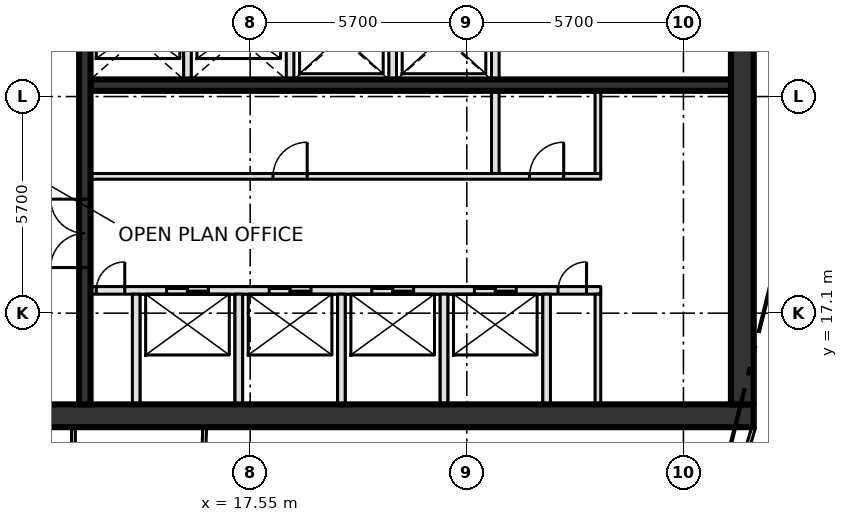
"""IFC4 building model, lengths in metres.
Left out: names, types, materials, properties, quantities, classifications, styles, units other than length and angle.
Written with IfcOpenShell. Run it as: python <this file> out.ifc"""

import sys

from ifc_helpers import new_model, si_unit, direction, frame, frame_2d, origin, place, context, subcontext, project, spatial, rectangle, extrude, element, fill, save


model = new_model("IFC4")
c1 = context("Model", 3, precision=1e-05, world=origin(), true_north=direction((0.0, 1.0)))
c2 = subcontext(c1, "Body", "Model", "MODEL_VIEW")
j1 = project(units=[si_unit("LENGTHUNIT", "METRE"), si_unit("PLANEANGLEUNIT", "RADIAN")], contexts=[c1])
p1 = place(None, origin())
s1 = spatial("IfcSite", under=j1, at=p1, CompositionType="ELEMENT")
p2 = place(p1, origin())
s2 = spatial("IfcBuilding", under=s1, at=p2, CompositionType="ELEMENT")
p3 = place(p2, frame((0.0, 0.0, 344.4)))
s3 = spatial("IfcBuildingStorey", under=s2, at=p3, CompositionType="ELEMENT", Elevation=344.4)
p4 = place(p3, frame((8.0, 14.4, -0.3), z_axis=(0.0, 0.0, 1.0), x_axis=(1.0, 0.0, 0.0)))
e1 = element("IfcWall", 1, at=p4, inside=s3, PredefinedType="SHEAR", context=c2, shape_type="SweptSolid", body=[
    extrude(rectangle(XDim=22.8, YDim=0.6, at=frame_2d((11.4, 0.0))), origin(), (0.0, 0.0, 1.0), 4.05),
])
p5 = place(p4, frame((2.3, 0.0, 0.3)))
e2 = element("IfcOpeningElement", 2, at=p5, cuts=e1, PredefinedType="OPENING", context=c2, shape_type="SweptSolid", body=[
    extrude(rectangle(XDim=1.8, YDim=2.1, at=frame_2d((0.9, 1.05))), frame((0.0, 0.31, 0.0), z_axis=(0.0, -1.0, 0.0), x_axis=(1.0, 0.0, 0.0)), (0.0, 0.0, 1.0), 0.62),
])
p6 = place(p3, frame((30.5, 14.7, -0.3), z_axis=(0.0, 0.0, 1.0), x_axis=(0.0, 1.0, 0.0)))
e3 = element("IfcWall", 3, at=p6, inside=s3, PredefinedType="SHEAR", context=c2, shape_type="SweptSolid", body=[
    extrude(rectangle(XDim=21.0, YDim=0.6, at=frame_2d((10.5, 0.0))), origin(), (0.0, 0.0, 1.0), 4.05),
])
p7 = place(p3, frame((13.35, 17.7, 0.0), z_axis=(0.0, 0.0, 1.0), x_axis=(1.0, 0.0, 0.0)))
e4 = element("IfcWall", 4, at=p7, inside=s3, PredefinedType="SOLIDWALL", context=c2, shape_type="SweptSolid", body=[
    extrude(rectangle(XDim=13.425, YDim=0.2, at=frame_2d((6.712, 0.0))), origin(), (0.0, 0.0, 1.0), 3.75),
])
p8 = place(p7, frame((2.0, 0.0, 0.0)))
e5 = element("IfcOpeningElement", 5, at=p8, cuts=e4, PredefinedType="OPENING", context=c2, shape_type="SweptSolid", body=[
    extrude(rectangle(XDim=1.1, YDim=2.1, at=frame_2d((0.55, 1.05))), frame((0.0, 0.11, 0.0), z_axis=(0.0, -1.0, 0.0), x_axis=(1.0, 0.0, 0.0)), (0.0, 0.0, 1.0), 0.22),
])
p9 = place(p7, frame((4.7, 0.0, 0.0)))
e6 = element("IfcOpeningElement", 6, at=p9, cuts=e4, PredefinedType="OPENING", context=c2, shape_type="SweptSolid", body=[
    extrude(rectangle(XDim=1.1, YDim=2.1, at=frame_2d((0.55, 1.05))), frame((0.0, 0.11, 0.0), z_axis=(0.0, -1.0, 0.0), x_axis=(1.0, 0.0, 0.0)), (0.0, 0.0, 1.0), 0.22),
])
p10 = place(p7, frame((7.4, 0.0, 0.0)))
e7 = element("IfcOpeningElement", 7, at=p10, cuts=e4, PredefinedType="OPENING", context=c2, shape_type="SweptSolid", body=[
    extrude(rectangle(XDim=1.1, YDim=2.1, at=frame_2d((0.55, 1.05))), frame((0.0, 0.11, 0.0), z_axis=(0.0, -1.0, 0.0), x_axis=(1.0, 0.0, 0.0)), (0.0, 0.0, 1.0), 0.22),
])
p11 = place(p7, frame((10.1, 0.0, 0.0)))
e8 = element("IfcOpeningElement", 8, at=p11, cuts=e4, PredefinedType="OPENING", context=c2, shape_type="SweptSolid", body=[
    extrude(rectangle(XDim=1.1, YDim=2.1, at=frame_2d((0.55, 1.05))), frame((0.0, 0.11, 0.0), z_axis=(0.0, -1.0, 0.0), x_axis=(1.0, 0.0, 0.0)), (0.0, 0.0, 1.0), 0.22),
])
p12 = place(p7, frame((0.15, 0.0, 0.0)))
e9 = element("IfcOpeningElement", 9, at=p12, cuts=e4, PredefinedType="OPENING", context=c2, shape_type="SweptSolid", body=[
    extrude(rectangle(XDim=0.75, YDim=2.1, at=frame_2d((0.375, 1.05))), frame((0.0, 0.11, 0.0), z_axis=(0.0, -1.0, 0.0), x_axis=(1.0, 0.0, 0.0)), (0.0, 0.0, 1.0), 0.22),
])
p13 = place(p7, frame((12.3, 0.0, 0.0)))
e10 = element("IfcOpeningElement", 10, at=p13, cuts=e4, PredefinedType="OPENING", context=c2, shape_type="SweptSolid", body=[
    extrude(rectangle(XDim=0.75, YDim=2.1, at=frame_2d((0.375, 1.05))), frame((0.0, 0.11, 0.0), z_axis=(0.0, -1.0, 0.0), x_axis=(1.0, 0.0, 0.0)), (0.0, 0.0, 1.0), 0.22),
])
p14 = place(p3, frame((13.35, 20.7, 0.0), z_axis=(0.0, 0.0, 1.0), x_axis=(1.0, 0.0, 0.0)))
e11 = element("IfcWall", 11, at=p14, inside=s3, PredefinedType="PARTITIONING", context=c2, shape_type="SweptSolid", body=[
    extrude(rectangle(XDim=13.425, YDim=0.15, at=frame_2d((6.712, 0.0))), origin(), (0.0, 0.0, 1.0), 3.75),
])
p15 = place(p14, frame((4.8, 0.0, 0.0)))
e12 = element("IfcOpeningElement", 12, at=p15, cuts=e11, PredefinedType="OPENING", context=c2, shape_type="SweptSolid", body=[
    extrude(rectangle(XDim=0.9, YDim=2.1, at=frame_2d((0.45, 1.05))), frame((0.0, 0.085, 0.0), z_axis=(0.0, -1.0, 0.0), x_axis=(1.0, 0.0, 0.0)), (0.0, 0.0, 1.0), 0.17),
])
p16 = place(p14, frame((11.55, 0.0, 0.0)))
e13 = element("IfcOpeningElement", 13, at=p16, cuts=e11, PredefinedType="OPENING", context=c2, shape_type="SweptSolid", body=[
    extrude(rectangle(XDim=0.9, YDim=2.1, at=frame_2d((0.45, 1.05))), frame((0.0, 0.085, 0.0), z_axis=(0.0, -1.0, 0.0), x_axis=(1.0, 0.0, 0.0)), (0.0, 0.0, 1.0), 0.17),
])
p17 = place(p3, frame((13.35, 23.1, 0.0), z_axis=(0.0, 0.0, 1.0), x_axis=(1.0, 0.0, 0.0)))
e14 = element("IfcWall", 14, at=p17, inside=s3, PredefinedType="SHEAR", context=c2, shape_type="SweptSolid", body=[
    extrude(rectangle(XDim=16.85, YDim=0.3, at=frame_2d((8.425, 0.0))), origin(), (0.0, 0.0, 1.0), 3.75),
])
p18 = place(p3, frame((13.2, 14.7, 0.0), z_axis=(0.0, 0.0, 1.0), x_axis=(0.0, 1.0, 0.0)))
e15 = element("IfcWall", 15, at=p18, inside=s3, PredefinedType="SHEAR", context=c2, shape_type="SweptSolid", body=[
    extrude(rectangle(XDim=21.0, YDim=0.3, at=frame_2d((10.5, 0.0))), origin(), (0.0, 0.0, 1.0), 3.75),
])
p19 = place(p18, frame((3.6, 0.0, 0.0)))
e16 = element("IfcOpeningElement", 16, at=p19, cuts=e15, PredefinedType="OPENING", context=c2, shape_type="SweptSolid", body=[
    extrude(rectangle(XDim=1.8, YDim=2.1, at=frame_2d((0.9, 1.05))), frame((0.0, 0.16, 0.0), z_axis=(0.0, -1.0, 0.0), x_axis=(1.0, 0.0, 0.0)), (0.0, 0.0, 1.0), 0.32),
])
p20 = place(p18, frame((11.7, 0.0, 0.0)))
e17 = element("IfcOpeningElement", 17, at=p20, cuts=e15, PredefinedType="OPENING", context=c2, shape_type="SweptSolid", body=[
    extrude(rectangle(XDim=1.2, YDim=2.1, at=frame_2d((0.6, 1.05))), frame((0.0, 0.16, 0.0), z_axis=(0.0, -1.0, 0.0), x_axis=(1.0, 0.0, 0.0)), (0.0, 0.0, 1.0), 0.32),
])
p21 = place(p3, frame((14.55, 14.7, 0.0), z_axis=(0.0, 0.0, 1.0), x_axis=(0.0, 1.0, 0.0)))
e18 = element("IfcWall", 18, at=p21, inside=s3, PredefinedType="SOLIDWALL", context=c2, shape_type="SweptSolid", body=[
    extrude(rectangle(XDim=2.9, YDim=0.2, at=frame_2d((1.45, 0.0))), origin(), (0.0, 0.0, 1.0), 3.75),
])
p22 = place(p3, frame((15.9, 23.25, 0.0), z_axis=(0.0, 0.0, 1.0), x_axis=(0.0, 1.0, 0.0)))
e19 = element("IfcWall", 19, at=p22, inside=s3, PredefinedType="SOLIDWALL", context=c2, shape_type="SweptSolid", body=[
    extrude(rectangle(XDim=2.15, YDim=0.2, at=frame_2d((1.075, 0.0))), origin(), (0.0, 0.0, 1.0), 3.75),
])
p23 = place(p3, frame((17.25, 14.7, 0.0), z_axis=(0.0, 0.0, 1.0), x_axis=(0.0, 1.0, 0.0)))
e20 = element("IfcWall", 20, at=p23, inside=s3, PredefinedType="SOLIDWALL", context=c2, shape_type="SweptSolid", body=[
    extrude(rectangle(XDim=2.9, YDim=0.2, at=frame_2d((1.45, 0.0))), origin(), (0.0, 0.0, 1.0), 3.75),
])
p24 = place(p3, frame((18.6, 23.25, 0.0), z_axis=(0.0, 0.0, 1.0), x_axis=(0.0, 1.0, 0.0)))
e21 = element("IfcWall", 21, at=p24, inside=s3, PredefinedType="SOLIDWALL", context=c2, shape_type="SweptSolid", body=[
    extrude(rectangle(XDim=5.15, YDim=0.2, at=frame_2d((2.575, 0.0))), origin(), (0.0, 0.0, 1.0), 3.75),
])
p25 = place(p24, frame((3.15, 0.0, 0.0)))
e22 = element("IfcOpeningElement", 22, at=p25, cuts=e21, PredefinedType="OPENING", context=c2, shape_type="SweptSolid", body=[
    extrude(rectangle(XDim=1.2, YDim=2.1, at=frame_2d((0.6, 1.05))), frame((0.0, 0.11, 0.0), z_axis=(0.0, -1.0, 0.0), x_axis=(1.0, 0.0, 0.0)), (0.0, 0.0, 1.0), 0.22),
])
p26 = place(p3, frame((19.95, 14.7, 0.0), z_axis=(0.0, 0.0, 1.0), x_axis=(0.0, 1.0, 0.0)))
e23 = element("IfcWall", 23, at=p26, inside=s3, PredefinedType="SOLIDWALL", context=c2, shape_type="SweptSolid", body=[
    extrude(rectangle(XDim=2.9, YDim=0.2, at=frame_2d((1.45, 0.0))), origin(), (0.0, 0.0, 1.0), 3.75),
])
p27 = place(p3, frame((21.3, 23.25, 0.0), z_axis=(0.0, 0.0, 1.0), x_axis=(0.0, 1.0, 0.0)))
e24 = element("IfcWall", 24, at=p27, inside=s3, PredefinedType="SOLIDWALL", context=c2, shape_type="SweptSolid", body=[
    extrude(rectangle(XDim=2.15, YDim=0.2, at=frame_2d((1.075, 0.0))), origin(), (0.0, 0.0, 1.0), 3.75),
])
p28 = place(p3, frame((22.65, 14.7, 0.0), z_axis=(0.0, 0.0, 1.0), x_axis=(0.0, 1.0, 0.0)))
e25 = element("IfcWall", 25, at=p28, inside=s3, PredefinedType="SOLIDWALL", context=c2, shape_type="SweptSolid", body=[
    extrude(rectangle(XDim=2.9, YDim=0.2, at=frame_2d((1.45, 0.0))), origin(), (0.0, 0.0, 1.0), 3.75),
])
p29 = place(p3, frame((24.0, 20.775, 0.0), z_axis=(0.0, 0.0, 1.0), x_axis=(0.0, 1.0, 0.0)))
e26 = element("IfcWall", 26, at=p29, inside=s3, PredefinedType="SOLIDWALL", context=c2, shape_type="SweptSolid", body=[
    extrude(rectangle(XDim=4.625, YDim=0.2, at=frame_2d((2.312, 0.0))), origin(), (0.0, 0.0, 1.0), 3.75),
])
p30 = place(p3, frame((25.35, 14.7, 0.0), z_axis=(0.0, 0.0, 1.0), x_axis=(0.0, 1.0, 0.0)))
e27 = element("IfcWall", 27, at=p30, inside=s3, PredefinedType="SOLIDWALL", context=c2, shape_type="SweptSolid", body=[
    extrude(rectangle(XDim=2.9, YDim=0.2, at=frame_2d((1.45, 0.0))), origin(), (0.0, 0.0, 1.0), 3.75),
])
p31 = place(p3, frame((26.7, 14.7, 0.0), z_axis=(0.0, 0.0, 1.0), x_axis=(0.0, 1.0, 0.0)))
e28 = element("IfcWall", 28, at=p31, inside=s3, PredefinedType="PARTITIONING", context=c2, shape_type="SweptSolid", body=[
    extrude(rectangle(XDim=2.9, YDim=0.15, at=frame_2d((1.45, 0.0))), origin(), (0.0, 0.0, 1.0), 3.75),
])
p32 = place(p3, frame((26.7, 20.775, 0.0), z_axis=(0.0, 0.0, 1.0), x_axis=(0.0, 1.0, 0.0)))
e29 = element("IfcWall", 29, at=p32, inside=s3, PredefinedType="PARTITIONING", context=c2, shape_type="SweptSolid", body=[
    extrude(rectangle(XDim=2.175, YDim=0.15, at=frame_2d((1.087, 0.0))), origin(), (0.0, 0.0, 1.0), 3.75),
])
p33 = place(p3, frame((12.9, 10.078, 0.0), z_axis=(0.0, 0.0, 1.0), x_axis=(0.0, 1.0, 0.0)))
e30 = element("IfcWall", 30, at=p33, inside=s3, PredefinedType="PARTITIONING", context=c2, shape_type="SweptSolid", body=[
    extrude(rectangle(XDim=4.022, YDim=0.1, at=frame_2d((2.011, 0.0))), origin(), (0.0, 0.0, 1.0), 3.75),
])
p34 = place(p33, frame((1.48, 0.0, 0.0)))
e31 = element("IfcOpeningElement", 31, at=p34, cuts=e30, PredefinedType="OPENING", context=c2, shape_type="SweptSolid", body=[
    extrude(rectangle(XDim=1.0, YDim=2.1, at=frame_2d((0.5, 1.05))), frame((0.0, 0.06, 0.0), z_axis=(0.0, -1.0, 0.0), x_axis=(1.0, 0.0, 0.0)), (0.0, 0.0, 1.0), 0.12),
])
p35 = place(p3, frame((30.8, 14.1, 0.0), z_axis=(0.0, 0.0, 1.0), x_axis=(-0.28588265334, -0.958264633867, 0.0)))
e32 = element("IfcWall", 32, at=p35, inside=s3, PredefinedType="PARTITIONING", context=c2, shape_type="SweptSolid", body=[
    extrude(rectangle(XDim=8.776, YDim=0.1, at=frame_2d((4.388, 0.0))), origin(), (0.0, 0.0, 1.0), 3.75),
])
p36 = place(p3, frame((16.167, 8.775, 0.0), z_axis=(0.0, 0.0, 1.0), x_axis=(0.034913599617, 0.999390334435, 0.0)))
e33 = element("IfcWall", 33, at=p36, inside=s3, PredefinedType="PARTITIONING", context=c2, shape_type="SweptSolid", body=[
    extrude(rectangle(XDim=5.328, YDim=0.1, at=frame_2d((2.664, 0.0))), origin(), (0.0, 0.0, 1.0), 3.75),
])
p37 = place(p8, origin())
e34 = element("IfcDoor", 34, at=p37, inside=s3, OperationType="SLIDING_TO_LEFT", PredefinedType="DOOR", context=c2, shape_type="SweptSolid", body=[
    extrude(rectangle(XDim=1.1, YDim=2.1, at=frame_2d((0.55, 1.05))), frame((0.0, 0.025, 0.0), z_axis=(0.0, -1.0, 0.0), x_axis=(1.0, 0.0, 0.0)), (0.0, 0.0, 1.0), 0.05),
])
fill(e5, e34)
p38 = place(p9, origin())
e35 = element("IfcDoor", 35, at=p38, inside=s3, OperationType="SLIDING_TO_LEFT", PredefinedType="DOOR", context=c2, shape_type="SweptSolid", body=[
    extrude(rectangle(XDim=1.1, YDim=2.1, at=frame_2d((0.55, 1.05))), frame((0.0, 0.025, 0.0), z_axis=(0.0, -1.0, 0.0), x_axis=(1.0, 0.0, 0.0)), (0.0, 0.0, 1.0), 0.05),
])
fill(e6, e35)
p39 = place(p10, origin())
e36 = element("IfcDoor", 36, at=p39, inside=s3, OperationType="SLIDING_TO_LEFT", PredefinedType="DOOR", context=c2, shape_type="SweptSolid", body=[
    extrude(rectangle(XDim=1.1, YDim=2.1, at=frame_2d((0.55, 1.05))), frame((0.0, 0.025, 0.0), z_axis=(0.0, -1.0, 0.0), x_axis=(1.0, 0.0, 0.0)), (0.0, 0.0, 1.0), 0.05),
])
fill(e7, e36)
p40 = place(p11, origin())
e37 = element("IfcDoor", 37, at=p40, inside=s3, OperationType="SLIDING_TO_LEFT", PredefinedType="DOOR", context=c2, shape_type="SweptSolid", body=[
    extrude(rectangle(XDim=1.1, YDim=2.1, at=frame_2d((0.55, 1.05))), frame((0.0, 0.025, 0.0), z_axis=(0.0, -1.0, 0.0), x_axis=(1.0, 0.0, 0.0)), (0.0, 0.0, 1.0), 0.05),
])
fill(e8, e37)
p41 = place(p12, origin())
e38 = element("IfcDoor", 38, at=p41, inside=s3, OperationType="SINGLE_SWING_RIGHT", PredefinedType="DOOR", context=c2, shape_type="SweptSolid", body=[
    extrude(rectangle(XDim=0.75, YDim=2.1, at=frame_2d((0.375, 1.05))), frame((0.0, 0.025, 0.0), z_axis=(0.0, -1.0, 0.0), x_axis=(1.0, 0.0, 0.0)), (0.0, 0.0, 1.0), 0.05),
])
fill(e9, e38)
p42 = place(p13, origin())
e39 = element("IfcDoor", 39, at=p42, inside=s3, OperationType="SINGLE_SWING_RIGHT", PredefinedType="DOOR", context=c2, shape_type="SweptSolid", body=[
    extrude(rectangle(XDim=0.75, YDim=2.1, at=frame_2d((0.375, 1.05))), frame((0.0, 0.025, 0.0), z_axis=(0.0, -1.0, 0.0), x_axis=(1.0, 0.0, 0.0)), (0.0, 0.0, 1.0), 0.05),
])
fill(e10, e39)
p43 = place(p15, origin())
e40 = element("IfcDoor", 40, at=p43, inside=s3, OperationType="SINGLE_SWING_RIGHT", PredefinedType="DOOR", context=c2, shape_type="SweptSolid", body=[
    extrude(rectangle(XDim=0.9, YDim=2.1, at=frame_2d((0.45, 1.05))), frame((0.0, 0.025, 0.0), z_axis=(0.0, -1.0, 0.0), x_axis=(1.0, 0.0, 0.0)), (0.0, 0.0, 1.0), 0.05),
])
fill(e12, e40)
p44 = place(p16, origin())
e41 = element("IfcDoor", 41, at=p44, inside=s3, OperationType="SINGLE_SWING_RIGHT", PredefinedType="DOOR", context=c2, shape_type="SweptSolid", body=[
    extrude(rectangle(XDim=0.9, YDim=2.1, at=frame_2d((0.45, 1.05))), frame((0.0, 0.025, 0.0), z_axis=(0.0, -1.0, 0.0), x_axis=(1.0, 0.0, 0.0)), (0.0, 0.0, 1.0), 0.05),
])
fill(e13, e41)
p45 = place(p19, origin())
e42 = element("IfcDoor", 42, at=p45, inside=s3, OperationType="DOUBLE_DOOR_SINGLE_SWING", PredefinedType="DOOR", context=c2, shape_type="SweptSolid", body=[
    extrude(rectangle(XDim=1.8, YDim=2.1, at=frame_2d((0.9, 1.05))), frame((0.0, 0.025, 0.0), z_axis=(0.0, -1.0, 0.0), x_axis=(1.0, 0.0, 0.0)), (0.0, 0.0, 1.0), 0.05),
])
fill(e16, e42)
save(model, sys.argv[1])
